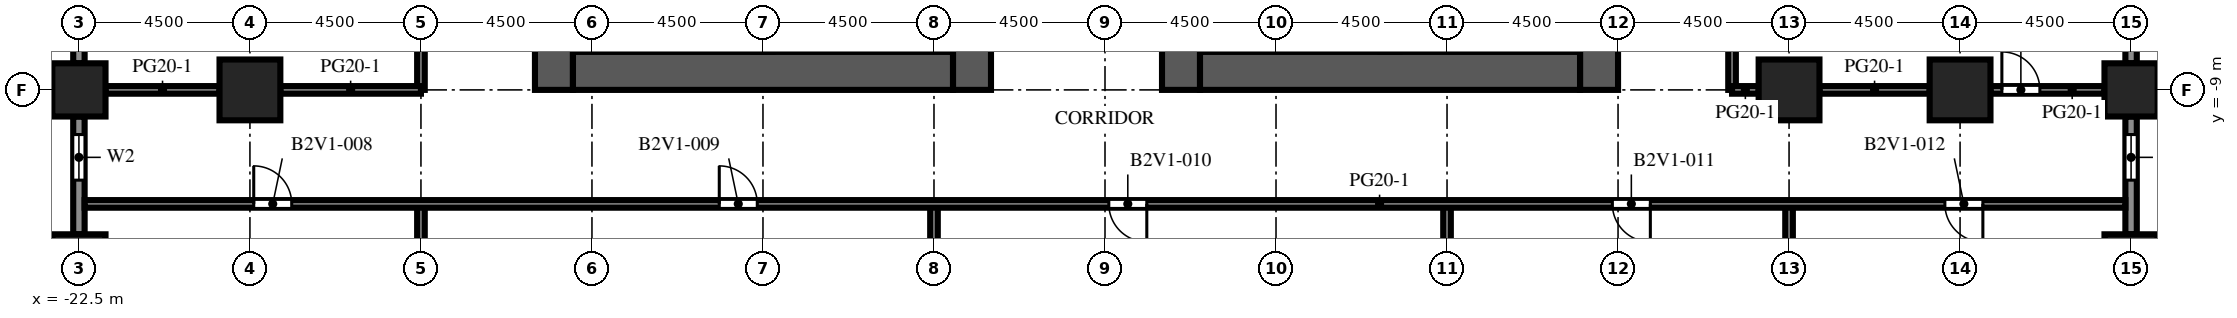
"""IFC4 building model, lengths in metres.
Left out: names, types, materials, properties, quantities, classifications, styles, units other than length and angle.
Written with IfcOpenShell. Run it as: python <this file> out.ifc"""

import sys

from ifc_helpers import new_model, si_unit, direction, frame, frame_2d, origin, origin_2d, place, context, subcontext, project, spatial, rectangle, extrude, element, fill, save


model = new_model("IFC4")
c1 = context("Model", 3, precision=1e-05, world=origin(), true_north=direction((0.0, 1.0)))
c2 = subcontext(c1, "Body", "Model", "MODEL_VIEW")
j1 = project(units=[si_unit("LENGTHUNIT", "METRE"), si_unit("PLANEANGLEUNIT", "RADIAN")], contexts=[c1])
p1 = place(None, origin())
s1 = spatial("IfcSite", under=j1, at=p1, CompositionType="ELEMENT")
p2 = place(p1, origin())
s2 = spatial("IfcBuilding", under=s1, at=p2, CompositionType="ELEMENT")
p3 = place(p2, frame((0.0, 0.0, 46.0)))
s3 = spatial("IfcBuildingStorey", under=s2, at=p3, CompositionType="ELEMENT", Elevation=46.0)
for number, where, z_axis, x_axis in (
    (1, (-22.5, -13.5, 0.0), (0.0, 0.0, 1.0), (1.0, 0.0, 0.0)),
    (2, (-22.5, -9.0, 0.0), (0.0, 0.0, 1.0), (1.0, 0.0, 0.0)),
    (3, (31.5, -13.5, 0.0), (0.0, 0.0, 1.0), (1.0, 0.0, 0.0)),
    (4, (31.5, -9.0, 0.0), (0.0, 0.0, 1.0), (1.0, 0.0, 0.0)),
):
    element("IfcColumn", number, at=place(p3, frame(where, z_axis=z_axis, x_axis=x_axis)), inside=s3, PredefinedType="COLUMN", context=c2, shape_type="SweptSolid", body=[
        extrude(rectangle(XDim=1.4, YDim=1.4, at=origin_2d()), origin(), (0.0, 0.0, 1.0), 4.1),
    ])
for number, where, z_axis, x_axis in (
    (5, (-18.0, -9.0, 0.0), (0.0, 0.0, 1.0), (1.0, 0.0, 0.0)),
    (6, (22.5, -9.0, 0.0), (0.0, 0.0, 1.0), (1.0, 0.0, 0.0)),
    (7, (27.0, -9.0, 0.0), (0.0, 0.0, 1.0), (1.0, 0.0, 0.0)),
):
    element("IfcColumn", number, at=place(p3, frame(where, z_axis=z_axis, x_axis=x_axis)), inside=s3, PredefinedType="COLUMN", context=c2, shape_type="SweptSolid", body=[
        extrude(rectangle(XDim=1.6, YDim=1.6, at=origin_2d()), origin(), (0.0, 0.0, 1.0), 4.1),
    ])
p4 = place(p3, frame((-10.0, -9.0, 0.0), z_axis=(0.0, 0.0, 1.0), x_axis=(0.0, 1.0, 0.0)))
e8 = element("IfcWall", 8, at=p4, inside=s3, PredefinedType="SHEAR", context=c2, shape_type="SweptSolid", body=[
    extrude(rectangle(XDim=27.5, YDim=1.0, at=frame_2d((13.75, 0.0))), origin(), (0.0, 0.0, 1.0), 4.1),
])
p5 = place(p4, frame((12.55, 0.0, 0.0)))
e9 = element("IfcOpeningElement", 9, at=p5, cuts=e8, PredefinedType="OPENING", context=c2, shape_type="SweptSolid", body=[
    extrude(rectangle(XDim=2.4, YDim=2.4, at=frame_2d((1.2, 1.2))), frame((0.0, 0.51, 0.0), z_axis=(0.0, -1.0, 0.0), x_axis=(1.0, 0.0, 0.0)), (0.0, 0.0, 1.0), 1.02),
])
p6 = place(p4, frame((6.825, 0.0, 0.0)))
e10 = element("IfcOpeningElement", 10, at=p6, cuts=e8, PredefinedType="OPENING", context=c2, shape_type="SweptSolid", body=[
    extrude(rectangle(XDim=1.2, YDim=2.1, at=frame_2d((0.6, 1.05))), frame((0.0, 0.51, 0.0), z_axis=(0.0, -1.0, 0.0), x_axis=(1.0, 0.0, 0.0)), (0.0, 0.0, 1.0), 1.02),
])
p7 = place(p4, frame((19.475, 0.0, 0.0)))
e11 = element("IfcOpeningElement", 11, at=p7, cuts=e8, PredefinedType="OPENING", context=c2, shape_type="SweptSolid", body=[
    extrude(rectangle(XDim=1.2, YDim=2.1, at=frame_2d((0.6, 1.05))), frame((0.0, 0.51, 0.0), z_axis=(0.0, -1.0, 0.0), x_axis=(1.0, 0.0, 0.0)), (0.0, 0.0, 1.0), 1.02),
])
p8 = place(p3, frame((1.0, -9.0, 0.0), z_axis=(0.0, 0.0, 1.0), x_axis=(0.0, 1.0, 0.0)))
e12 = element("IfcWall", 12, at=p8, inside=s3, PredefinedType="SHEAR", context=c2, shape_type="SweptSolid", body=[
    extrude(rectangle(XDim=27.5, YDim=1.0, at=frame_2d((13.75, 0.0))), origin(), (0.0, 0.0, 1.0), 4.1),
])
p9 = place(p8, frame((12.55, 0.0, 0.0)))
e13 = element("IfcOpeningElement", 13, at=p9, cuts=e12, PredefinedType="OPENING", context=c2, shape_type="SweptSolid", body=[
    extrude(rectangle(XDim=2.4, YDim=2.4, at=frame_2d((1.2, 1.2))), frame((0.0, 0.51, 0.0), z_axis=(0.0, -1.0, 0.0), x_axis=(1.0, 0.0, 0.0)), (0.0, 0.0, 1.0), 1.02),
])
p10 = place(p8, frame((4.025, 0.0, 0.0)))
e14 = element("IfcOpeningElement", 14, at=p10, cuts=e12, PredefinedType="OPENING", context=c2, shape_type="SweptSolid", body=[
    extrude(rectangle(XDim=1.2, YDim=2.1, at=frame_2d((0.6, 1.05))), frame((0.0, 0.51, 0.0), z_axis=(0.0, -1.0, 0.0), x_axis=(1.0, 0.0, 0.0)), (0.0, 0.0, 1.0), 1.02),
])
p11 = place(p8, frame((22.275, 0.0, 0.0)))
e15 = element("IfcOpeningElement", 15, at=p11, cuts=e12, PredefinedType="OPENING", context=c2, shape_type="SweptSolid", body=[
    extrude(rectangle(XDim=1.2, YDim=2.1, at=frame_2d((0.6, 1.05))), frame((0.0, 0.51, 0.0), z_axis=(0.0, -1.0, 0.0), x_axis=(1.0, 0.0, 0.0)), (0.0, 0.0, 1.0), 1.02),
])
p12 = place(p3, frame((-9.5, -8.5, 0.0), z_axis=(0.0, 0.0, 1.0), x_axis=(1.0, 0.0, 0.0)))
e16 = element("IfcWall", 16, at=p12, inside=s3, PredefinedType="SHEAR", context=c2, shape_type="SweptSolid", body=[
    extrude(rectangle(XDim=10.0, YDim=1.0, at=frame_2d((5.0, 0.0))), origin(), (0.0, 0.0, 1.0), 4.1),
])
p13 = place(p3, frame((6.5, -9.0, 0.0), z_axis=(0.0, 0.0, 1.0), x_axis=(0.0, 1.0, 0.0)))
e17 = element("IfcWall", 17, at=p13, inside=s3, PredefinedType="SHEAR", context=c2, shape_type="SweptSolid", body=[
    extrude(rectangle(XDim=27.5, YDim=1.0, at=frame_2d((13.75, 0.0))), origin(), (0.0, 0.0, 1.0), 4.1),
])
p14 = place(p13, frame((12.55, 0.0, 0.0)))
e18 = element("IfcOpeningElement", 18, at=p14, cuts=e17, PredefinedType="OPENING", context=c2, shape_type="SweptSolid", body=[
    extrude(rectangle(XDim=2.4, YDim=2.4, at=frame_2d((1.2, 1.2))), frame((0.0, 0.51, 0.0), z_axis=(0.0, -1.0, 0.0), x_axis=(1.0, 0.0, 0.0)), (0.0, 0.0, 1.0), 1.02),
])
p15 = place(p13, frame((4.025, 0.0, 0.0)))
e19 = element("IfcOpeningElement", 19, at=p15, cuts=e17, PredefinedType="OPENING", context=c2, shape_type="SweptSolid", body=[
    extrude(rectangle(XDim=1.2, YDim=2.1, at=frame_2d((0.6, 1.05))), frame((0.0, 0.51, 0.0), z_axis=(0.0, -1.0, 0.0), x_axis=(1.0, 0.0, 0.0)), (0.0, 0.0, 1.0), 1.02),
])
p16 = place(p13, frame((22.275, 0.0, 0.0)))
e20 = element("IfcOpeningElement", 20, at=p16, cuts=e17, PredefinedType="OPENING", context=c2, shape_type="SweptSolid", body=[
    extrude(rectangle(XDim=1.2, YDim=2.1, at=frame_2d((0.6, 1.05))), frame((0.0, 0.51, 0.0), z_axis=(0.0, -1.0, 0.0), x_axis=(1.0, 0.0, 0.0)), (0.0, 0.0, 1.0), 1.02),
])
p17 = place(p3, frame((17.5, -9.0, 0.0), z_axis=(0.0, 0.0, 1.0), x_axis=(0.0, 1.0, 0.0)))
e21 = element("IfcWall", 21, at=p17, inside=s3, PredefinedType="SHEAR", context=c2, shape_type="SweptSolid", body=[
    extrude(rectangle(XDim=27.5, YDim=1.0, at=frame_2d((13.75, 0.0))), origin(), (0.0, 0.0, 1.0), 4.1),
])
p18 = place(p17, frame((12.55, 0.0, 0.0)))
e22 = element("IfcOpeningElement", 22, at=p18, cuts=e21, PredefinedType="OPENING", context=c2, shape_type="SweptSolid", body=[
    extrude(rectangle(XDim=2.4, YDim=2.4, at=frame_2d((1.2, 1.2))), frame((0.0, 0.51, 0.0), z_axis=(0.0, -1.0, 0.0), x_axis=(1.0, 0.0, 0.0)), (0.0, 0.0, 1.0), 1.02),
])
p19 = place(p17, frame((6.825, 0.0, 0.0)))
e23 = element("IfcOpeningElement", 23, at=p19, cuts=e21, PredefinedType="OPENING", context=c2, shape_type="SweptSolid", body=[
    extrude(rectangle(XDim=1.2, YDim=2.1, at=frame_2d((0.6, 1.05))), frame((0.0, 0.51, 0.0), z_axis=(0.0, -1.0, 0.0), x_axis=(1.0, 0.0, 0.0)), (0.0, 0.0, 1.0), 1.02),
])
p20 = place(p17, frame((19.475, 0.0, 0.0)))
e24 = element("IfcOpeningElement", 24, at=p20, cuts=e21, PredefinedType="OPENING", context=c2, shape_type="SweptSolid", body=[
    extrude(rectangle(XDim=1.2, YDim=2.1, at=frame_2d((0.6, 1.05))), frame((0.0, 0.51, 0.0), z_axis=(0.0, -1.0, 0.0), x_axis=(1.0, 0.0, 0.0)), (0.0, 0.0, 1.0), 1.02),
])
p21 = place(p3, frame((7.0, -8.5, 0.0), z_axis=(0.0, 0.0, 1.0), x_axis=(1.0, 0.0, 0.0)))
e25 = element("IfcWall", 25, at=p21, inside=s3, PredefinedType="SHEAR", context=c2, shape_type="SweptSolid", body=[
    extrude(rectangle(XDim=10.0, YDim=1.0, at=frame_2d((5.0, 0.0))), origin(), (0.0, 0.0, 1.0), 4.1),
])
p22 = place(p3, frame((31.5, -9.7, 0.0), z_axis=(0.0, 0.0, 1.0), x_axis=(0.0, -1.0, 0.0)))
e26 = element("IfcWall", 26, at=p22, inside=s3, PredefinedType="SOLIDWALL", context=c2, shape_type="SweptSolid", body=[
    extrude(rectangle(XDim=3.1, YDim=0.3, at=frame_2d((1.55, 0.0))), origin(), (0.0, 0.0, 1.0), 2.75),
])
p23 = place(p22, frame((0.475, 0.0, 0.8)))
e27 = element("IfcOpeningElement", 27, at=p23, cuts=e26, PredefinedType="OPENING", context=c2, shape_type="SweptSolid", body=[
    extrude(rectangle(XDim=1.2, YDim=1.7, at=frame_2d((0.6, 0.85))), frame((0.0, 0.16, 0.0), z_axis=(0.0, -1.0, 0.0), x_axis=(1.0, 0.0, 0.0)), (0.0, 0.0, 1.0), 0.32),
])
p24 = place(p3, frame((31.5, -5.2, 0.0), z_axis=(0.0, 0.0, 1.0), x_axis=(0.0, -1.0, 0.0)))
e28 = element("IfcWall", 28, at=p24, inside=s3, PredefinedType="SOLIDWALL", context=c2, shape_type="SweptSolid", body=[
    extrude(rectangle(XDim=3.1, YDim=0.3, at=frame_2d((1.55, 0.0))), origin(), (0.0, 0.0, 1.0), 2.75),
])
p25 = place(p24, frame((0.35, 0.0, 0.8)))
e29 = element("IfcOpeningElement", 29, at=p25, cuts=e28, PredefinedType="OPENING", context=c2, shape_type="SweptSolid", body=[
    extrude(rectangle(XDim=2.4, YDim=1.7, at=frame_2d((1.2, 0.85))), frame((0.0, 0.16, 0.0), z_axis=(0.0, -1.0, 0.0), x_axis=(1.0, 0.0, 0.0)), (0.0, 0.0, 1.0), 0.32),
])
p26 = place(p3, frame((-22.5, -8.3, 0.0), z_axis=(0.0, 0.0, 1.0), x_axis=(0.0, 1.0, 0.0)))
e30 = element("IfcWall", 30, at=p26, inside=s3, PredefinedType="SOLIDWALL", context=c2, shape_type="SweptSolid", body=[
    extrude(rectangle(XDim=3.1, YDim=0.3, at=frame_2d((1.55, 0.0))), origin(), (0.0, 0.0, 1.0), 2.75),
])
p27 = place(p26, frame((0.35, 0.0, 0.8)))
e31 = element("IfcOpeningElement", 31, at=p27, cuts=e30, PredefinedType="OPENING", context=c2, shape_type="SweptSolid", body=[
    extrude(rectangle(XDim=2.4, YDim=1.7, at=frame_2d((1.2, 0.85))), frame((0.0, 0.16, 0.0), z_axis=(0.0, -1.0, 0.0), x_axis=(1.0, 0.0, 0.0)), (0.0, 0.0, 1.0), 0.32),
])
p28 = place(p3, frame((-22.5, -12.8, 0.0), z_axis=(0.0, 0.0, 1.0), x_axis=(0.0, 1.0, 0.0)))
e32 = element("IfcWall", 32, at=p28, inside=s3, PredefinedType="SOLIDWALL", context=c2, shape_type="SweptSolid", body=[
    extrude(rectangle(XDim=3.1, YDim=0.3, at=frame_2d((1.55, 0.0))), origin(), (0.0, 0.0, 1.0), 2.75),
])
p29 = place(p28, frame((1.425, 0.0, 0.8)))
e33 = element("IfcOpeningElement", 33, at=p29, cuts=e32, PredefinedType="OPENING", context=c2, shape_type="SweptSolid", body=[
    extrude(rectangle(XDim=1.2, YDim=1.7, at=frame_2d((0.6, 0.85))), frame((0.0, 0.16, 0.0), z_axis=(0.0, -1.0, 0.0), x_axis=(1.0, 0.0, 0.0)), (0.0, 0.0, 1.0), 0.32),
])
p30 = place(p3, frame((-1.0, -8.0, 0.0), z_axis=(0.0, 0.0, 1.0), x_axis=(0.0, 1.0, 0.0)))
e34 = element("IfcWall", 34, at=p30, inside=s3, PredefinedType="PARTITIONING", context=c2, shape_type="SweptSolid", body=[
    extrude(rectangle(XDim=2.175, YDim=0.1, at=frame_2d((1.087, 0.0))), origin(), (0.0, 0.0, 1.0), 3.65),
])
p31 = place(p30, frame((0.587, 0.0, 0.0)))
e35 = element("IfcOpeningElement", 35, at=p31, cuts=e34, PredefinedType="OPENING", context=c2, shape_type="SweptSolid", body=[
    extrude(rectangle(XDim=1.0, YDim=2.1, at=frame_2d((0.5, 1.05))), frame((0.0, 0.06, 0.0), z_axis=(0.0, -1.0, 0.0), x_axis=(1.0, 0.0, 0.0)), (0.0, 0.0, 1.0), 0.12),
])
p32 = place(p3, frame((8.5, -8.0, 0.0), z_axis=(0.0, 0.0, 1.0), x_axis=(0.0, 1.0, 0.0)))
e36 = element("IfcWall", 36, at=p32, inside=s3, PredefinedType="PARTITIONING", context=c2, shape_type="SweptSolid", body=[
    extrude(rectangle(XDim=2.175, YDim=0.1, at=frame_2d((1.087, 0.0))), origin(), (0.0, 0.0, 1.0), 3.65),
])
p33 = place(p32, frame((0.587, 0.0, 0.0)))
e37 = element("IfcOpeningElement", 37, at=p33, cuts=e36, PredefinedType="OPENING", context=c2, shape_type="SweptSolid", body=[
    extrude(rectangle(XDim=1.0, YDim=2.1, at=frame_2d((0.5, 1.05))), frame((0.0, 0.06, 0.0), z_axis=(0.0, -1.0, 0.0), x_axis=(1.0, 0.0, 0.0)), (0.0, 0.0, 1.0), 0.12),
])
p34 = place(p3, frame((-13.5, -26.3, 0.0), z_axis=(0.0, 0.0, 1.0), x_axis=(0.0, 1.0, 0.0)))
e38 = element("IfcWall", 38, at=p34, inside=s3, PredefinedType="PARTITIONING", context=c2, shape_type="SweptSolid", body=[
    extrude(rectangle(XDim=14.3, YDim=0.2, at=frame_2d((7.15, 0.0))), origin(), (0.0, 0.0, 1.0), 3.65),
])
p35 = place(p3, frame((-13.5, -9.0, 0.0), z_axis=(0.0, 0.0, 1.0), x_axis=(0.0, 1.0, 0.0)))
e39 = element("IfcWall", 39, at=p35, inside=s3, PredefinedType="PARTITIONING", context=c2, shape_type="SweptSolid", body=[
    extrude(rectangle(XDim=27.5, YDim=0.2, at=frame_2d((13.75, 0.0))), origin(), (0.0, 0.0, 1.0), 3.65),
])
p36 = place(p35, frame((5.1, 0.0, 0.0)))
e40 = element("IfcOpeningElement", 40, at=p36, cuts=e39, PredefinedType="OPENING", context=c2, shape_type="SweptSolid", body=[
    extrude(rectangle(XDim=1.0, YDim=2.1, at=frame_2d((0.5, 1.05))), frame((0.0, 0.11, 0.0), z_axis=(0.0, -1.0, 0.0), x_axis=(1.0, 0.0, 0.0)), (0.0, 0.0, 1.0), 0.22),
])
p37 = place(p35, frame((15.6, 0.0, 0.0)))
e41 = element("IfcOpeningElement", 41, at=p37, cuts=e39, PredefinedType="OPENING", context=c2, shape_type="SweptSolid", body=[
    extrude(rectangle(XDim=1.0, YDim=2.1, at=frame_2d((0.5, 1.05))), frame((0.0, 0.11, 0.0), z_axis=(0.0, -1.0, 0.0), x_axis=(1.0, 0.0, 0.0)), (0.0, 0.0, 1.0), 0.22),
])
p38 = place(p3, frame((0.0, -17.2, 0.0), z_axis=(0.0, 0.0, 1.0), x_axis=(0.0, 1.0, 0.0)))
e42 = element("IfcWall", 42, at=p38, inside=s3, PredefinedType="PARTITIONING", context=c2, shape_type="SweptSolid", body=[
    extrude(rectangle(XDim=5.2, YDim=0.2, at=frame_2d((2.6, 0.0))), origin(), (0.0, 0.0, 1.0), 3.65),
])
p39 = place(p3, frame((13.5, -26.3, 0.0), z_axis=(0.0, 0.0, 1.0), x_axis=(0.0, 1.0, 0.0)))
e43 = element("IfcWall", 43, at=p39, inside=s3, PredefinedType="PARTITIONING", context=c2, shape_type="SweptSolid", body=[
    extrude(rectangle(XDim=14.3, YDim=0.2, at=frame_2d((7.15, 0.0))), origin(), (0.0, 0.0, 1.0), 3.65),
])
p40 = place(p3, frame((21.0, 18.5, 0.0), z_axis=(0.0, 0.0, 1.0), x_axis=(0.0, -1.0, 0.0)))
e44 = element("IfcWall", 44, at=p40, inside=s3, PredefinedType="PARTITIONING", context=c2, shape_type="SweptSolid", body=[
    extrude(rectangle(XDim=27.5, YDim=0.2, at=frame_2d((13.75, 0.0))), origin(), (0.0, 0.0, 1.0), 3.65),
])
p41 = place(p40, frame((10.9, 0.0, 0.0)))
e45 = element("IfcOpeningElement", 45, at=p41, cuts=e44, PredefinedType="OPENING", context=c2, shape_type="SweptSolid", body=[
    extrude(rectangle(XDim=1.0, YDim=2.1, at=frame_2d((0.5, 1.05))), frame((0.0, 0.11, 0.0), z_axis=(0.0, -1.0, 0.0), x_axis=(1.0, 0.0, 0.0)), (0.0, 0.0, 1.0), 0.22),
])
p42 = place(p3, frame((22.5, -17.2, 0.0), z_axis=(0.0, 0.0, 1.0), x_axis=(0.0, 1.0, 0.0)))
e46 = element("IfcWall", 46, at=p42, inside=s3, PredefinedType="PARTITIONING", context=c2, shape_type="SweptSolid", body=[
    extrude(rectangle(XDim=5.2, YDim=0.2, at=frame_2d((2.6, 0.0))), origin(), (0.0, 0.0, 1.0), 3.65),
])
p43 = place(p3, frame((31.35, -12.0, 0.0), z_axis=(0.0, 0.0, 1.0), x_axis=(-1.0, 0.0, 0.0)))
e47 = element("IfcWall", 47, at=p43, inside=s3, PredefinedType="PARTITIONING", context=c2, shape_type="SweptSolid", body=[
    extrude(rectangle(XDim=53.7, YDim=0.2, at=frame_2d((26.85, 0.0))), origin(), (0.0, 0.0, 1.0), 3.65),
])
p44 = place(p43, frame((48.25, 0.0, 0.0)))
e48 = element("IfcOpeningElement", 48, at=p44, cuts=e47, PredefinedType="OPENING", context=c2, shape_type="SweptSolid", body=[
    extrude(rectangle(XDim=1.0, YDim=2.1, at=frame_2d((0.5, 1.05))), frame((0.0, 0.11, 0.0), z_axis=(0.0, -1.0, 0.0), x_axis=(1.0, 0.0, 0.0)), (0.0, 0.0, 1.0), 0.22),
])
p45 = place(p43, frame((36.0, 0.0, 0.0)))
e49 = element("IfcOpeningElement", 49, at=p45, cuts=e47, PredefinedType="OPENING", context=c2, shape_type="SweptSolid", body=[
    extrude(rectangle(XDim=1.0, YDim=2.1, at=frame_2d((0.5, 1.05))), frame((0.0, 0.11, 0.0), z_axis=(0.0, -1.0, 0.0), x_axis=(1.0, 0.0, 0.0)), (0.0, 0.0, 1.0), 0.22),
])
p46 = place(p43, frame((25.75, 0.0, 0.0)))
e50 = element("IfcOpeningElement", 50, at=p46, cuts=e47, PredefinedType="OPENING", context=c2, shape_type="SweptSolid", body=[
    extrude(rectangle(XDim=1.0, YDim=2.1, at=frame_2d((0.5, 1.05))), frame((0.0, 0.11, 0.0), z_axis=(0.0, -1.0, 0.0), x_axis=(1.0, 0.0, 0.0)), (0.0, 0.0, 1.0), 0.22),
])
p47 = place(p43, frame((12.5, 0.0, 0.0)))
e51 = element("IfcOpeningElement", 51, at=p47, cuts=e47, PredefinedType="OPENING", context=c2, shape_type="SweptSolid", body=[
    extrude(rectangle(XDim=1.0, YDim=2.1, at=frame_2d((0.5, 1.05))), frame((0.0, 0.11, 0.0), z_axis=(0.0, -1.0, 0.0), x_axis=(1.0, 0.0, 0.0)), (0.0, 0.0, 1.0), 0.22),
])
p48 = place(p43, frame((3.75, 0.0, 0.0)))
e52 = element("IfcOpeningElement", 52, at=p48, cuts=e47, PredefinedType="OPENING", context=c2, shape_type="SweptSolid", body=[
    extrude(rectangle(XDim=1.0, YDim=2.1, at=frame_2d((0.5, 1.05))), frame((0.0, 0.11, 0.0), z_axis=(0.0, -1.0, 0.0), x_axis=(1.0, 0.0, 0.0)), (0.0, 0.0, 1.0), 0.22),
])
p49 = place(p3, frame((-21.8, -9.0, 0.0), z_axis=(0.0, 0.0, 1.0), x_axis=(1.0, 0.0, 0.0)))
e53 = element("IfcWall", 53, at=p49, inside=s3, PredefinedType="PARTITIONING", context=c2, shape_type="SweptSolid", body=[
    extrude(rectangle(XDim=3.0, YDim=0.2, at=frame_2d((1.5, 0.0))), origin(), (0.0, 0.0, 1.0), 3.65),
])
p50 = place(p3, frame((-17.2, -9.0, 0.0), z_axis=(0.0, 0.0, 1.0), x_axis=(1.0, 0.0, 0.0)))
e54 = element("IfcWall", 54, at=p50, inside=s3, PredefinedType="PARTITIONING", context=c2, shape_type="SweptSolid", body=[
    extrude(rectangle(XDim=3.7, YDim=0.2, at=frame_2d((1.85, 0.0))), origin(), (0.0, 0.0, 1.0), 3.65),
])
p51 = place(p3, frame((21.0, -9.0, 0.0), z_axis=(0.0, 0.0, 1.0), x_axis=(1.0, 0.0, 0.0)))
e55 = element("IfcWall", 55, at=p51, inside=s3, PredefinedType="PARTITIONING", context=c2, shape_type="SweptSolid", body=[
    extrude(rectangle(XDim=0.7, YDim=0.2, at=frame_2d((0.35, 0.0))), origin(), (0.0, 0.0, 1.0), 3.65),
])
p52 = place(p3, frame((23.3, -9.0, 0.0), z_axis=(0.0, 0.0, 1.0), x_axis=(1.0, 0.0, 0.0)))
e56 = element("IfcWall", 56, at=p52, inside=s3, PredefinedType="PARTITIONING", context=c2, shape_type="SweptSolid", body=[
    extrude(rectangle(XDim=2.9, YDim=0.2, at=frame_2d((1.45, 0.0))), origin(), (0.0, 0.0, 1.0), 3.65),
])
p53 = place(p3, frame((27.8, -9.0, 0.0), z_axis=(0.0, 0.0, 1.0), x_axis=(1.0, 0.0, 0.0)))
e57 = element("IfcWall", 57, at=p53, inside=s3, PredefinedType="PARTITIONING", context=c2, shape_type="SweptSolid", body=[
    extrude(rectangle(XDim=3.0, YDim=0.2, at=frame_2d((1.5, 0.0))), origin(), (0.0, 0.0, 1.0), 3.65),
])
p54 = place(p53, frame((0.3, 0.0, 0.0)))
e58 = element("IfcOpeningElement", 58, at=p54, cuts=e57, PredefinedType="OPENING", context=c2, shape_type="SweptSolid", body=[
    extrude(rectangle(XDim=1.0, YDim=2.1, at=frame_2d((0.5, 1.05))), frame((0.0, 0.11, 0.0), z_axis=(0.0, -1.0, 0.0), x_axis=(1.0, 0.0, 0.0)), (0.0, 0.0, 1.0), 0.22),
])
p55 = place(p23, origin())
e59 = element("IfcWindow", 59, at=p55, inside=s3, PartitioningType="SINGLE_PANEL", PredefinedType="WINDOW", context=c2, shape_type="SweptSolid", body=[
    extrude(rectangle(XDim=1.2, YDim=1.7, at=frame_2d((0.6, 0.85))), frame((0.0, 0.03, 0.0), z_axis=(0.0, -1.0, 0.0), x_axis=(1.0, 0.0, 0.0)), (0.0, 0.0, 1.0), 0.06),
])
fill(e27, e59)
p56 = place(p29, origin())
e60 = element("IfcWindow", 60, at=p56, inside=s3, PartitioningType="SINGLE_PANEL", PredefinedType="WINDOW", context=c2, shape_type="SweptSolid", body=[
    extrude(rectangle(XDim=1.2, YDim=1.7, at=frame_2d((0.6, 0.85))), frame((0.0, 0.03, 0.0), z_axis=(0.0, -1.0, 0.0), x_axis=(1.0, 0.0, 0.0)), (0.0, 0.0, 1.0), 0.06),
])
fill(e33, e60)
p57 = place(p44, origin())
e61 = element("IfcDoor", 61, at=p57, inside=s3, OperationType="SINGLE_SWING_RIGHT", PredefinedType="DOOR", context=c2, shape_type="SweptSolid", body=[
    extrude(rectangle(XDim=1.0, YDim=2.1, at=frame_2d((0.5, 1.05))), frame((0.0, 0.025, 0.0), z_axis=(0.0, -1.0, 0.0), x_axis=(1.0, 0.0, 0.0)), (0.0, 0.0, 1.0), 0.05),
])
fill(e48, e61)
p58 = place(p45, origin())
e62 = element("IfcDoor", 62, at=p58, inside=s3, OperationType="SINGLE_SWING_RIGHT", PredefinedType="DOOR", context=c2, shape_type="SweptSolid", body=[
    extrude(rectangle(XDim=1.0, YDim=2.1, at=frame_2d((0.5, 1.05))), frame((0.0, 0.025, 0.0), z_axis=(0.0, -1.0, 0.0), x_axis=(1.0, 0.0, 0.0)), (0.0, 0.0, 1.0), 0.05),
])
fill(e49, e62)
p59 = place(p46, origin())
e63 = element("IfcDoor", 63, at=p59, inside=s3, OperationType="SINGLE_SWING_LEFT", PredefinedType="DOOR", context=c2, shape_type="SweptSolid", body=[
    extrude(rectangle(XDim=1.0, YDim=2.1, at=frame_2d((0.5, 1.05))), frame((0.0, 0.025, 0.0), z_axis=(0.0, -1.0, 0.0), x_axis=(1.0, 0.0, 0.0)), (0.0, 0.0, 1.0), 0.05),
])
fill(e50, e63)
p60 = place(p47, origin())
e64 = element("IfcDoor", 64, at=p60, inside=s3, OperationType="SINGLE_SWING_LEFT", PredefinedType="DOOR", context=c2, shape_type="SweptSolid", body=[
    extrude(rectangle(XDim=1.0, YDim=2.1, at=frame_2d((0.5, 1.05))), frame((0.0, 0.025, 0.0), z_axis=(0.0, -1.0, 0.0), x_axis=(1.0, 0.0, 0.0)), (0.0, 0.0, 1.0), 0.05),
])
fill(e51, e64)
p61 = place(p48, origin())
e65 = element("IfcDoor", 65, at=p61, inside=s3, OperationType="SINGLE_SWING_LEFT", PredefinedType="DOOR", context=c2, shape_type="SweptSolid", body=[
    extrude(rectangle(XDim=1.0, YDim=2.1, at=frame_2d((0.5, 1.05))), frame((0.0, 0.025, 0.0), z_axis=(0.0, -1.0, 0.0), x_axis=(1.0, 0.0, 0.0)), (0.0, 0.0, 1.0), 0.05),
])
fill(e52, e65)
p62 = place(p54, origin())
e66 = element("IfcDoor", 66, at=p62, inside=s3, OperationType="SINGLE_SWING_LEFT", PredefinedType="DOOR", context=c2, shape_type="SweptSolid", body=[
    extrude(rectangle(XDim=1.0, YDim=2.1, at=frame_2d((0.5, 1.05))), frame((0.0, 0.025, 0.0), z_axis=(0.0, -1.0, 0.0), x_axis=(1.0, 0.0, 0.0)), (0.0, 0.0, 1.0), 0.05),
])
fill(e58, e66)
save(model, sys.argv[1])
